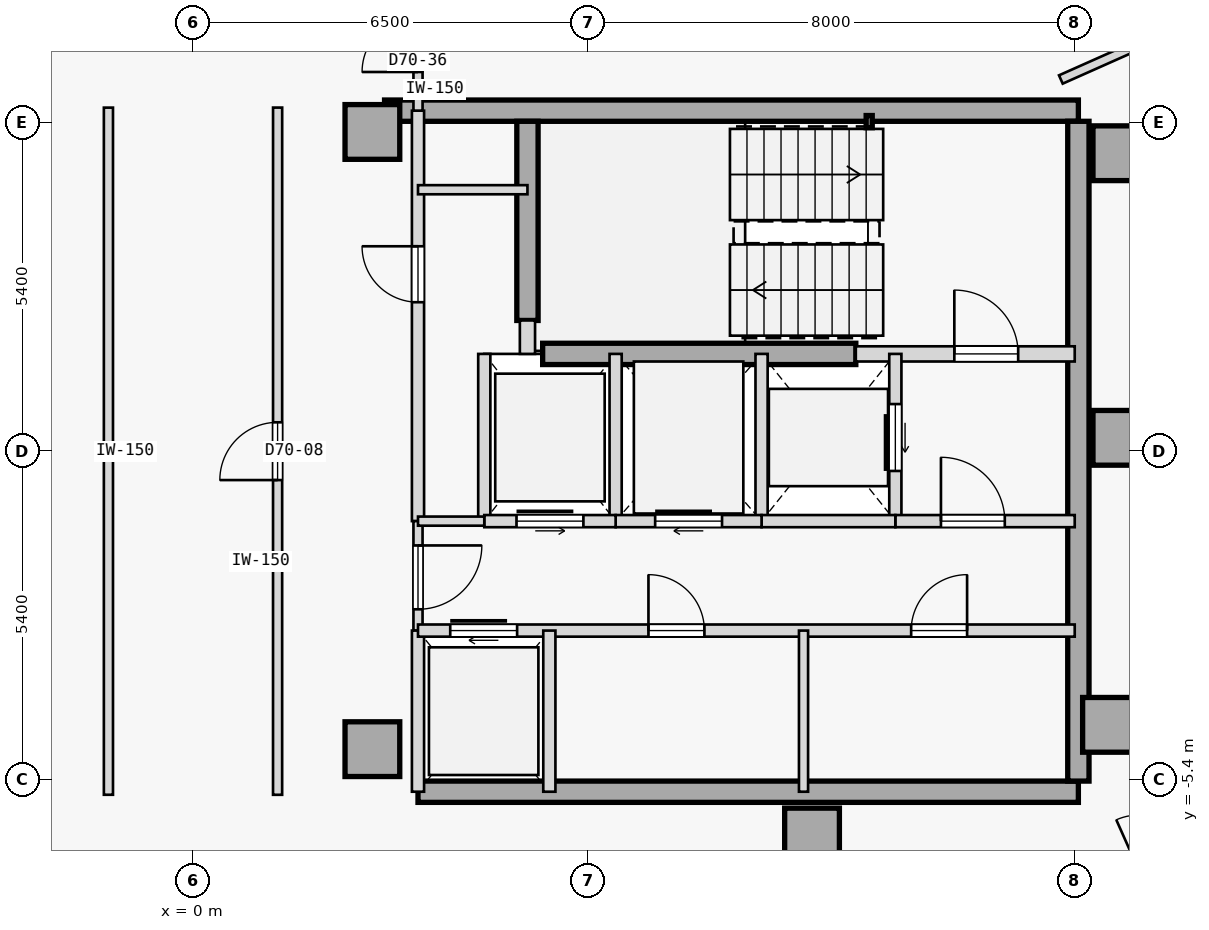
"""IFC4 building model, lengths in metres.
Left out: names, types, materials, properties, quantities, classifications, styles, units other than length and angle.
Written with IfcOpenShell. Run it as: python <this file> out.ifc"""

import sys

from ifc_helpers import new_model, si_unit, direction, frame, frame_2d, origin, origin_2d, place, context, subcontext, project, spatial, rectangle, hollow_rectangle, extrude, element, fill, save


model = new_model("IFC4")
c1 = context("Model", 3, precision=1e-05, world=origin(), true_north=direction((0.0, 1.0)))
c2 = subcontext(c1, "Body", "Model", "MODEL_VIEW")
j1 = project(units=[si_unit("LENGTHUNIT", "METRE"), si_unit("PLANEANGLEUNIT", "RADIAN")], contexts=[c1])
p1 = place(None, origin())
s1 = spatial("IfcSite", under=j1, at=p1, CompositionType="ELEMENT")
p2 = place(p1, origin())
s2 = spatial("IfcBuilding", under=s1, at=p2, CompositionType="ELEMENT")
p3 = place(p2, frame((0.0, 0.0, 262.2)))
s3 = spatial("IfcBuildingStorey", under=s2, at=p3, CompositionType="ELEMENT", Elevation=262.2)
for number, where, z_axis, x_axis in (
    (1, (15.25, 4.9, 0.0), (0.0, 0.0, 1.0), (1.0, 0.0, 0.0)),
    (2, (15.25, 0.22, 0.0), (0.0, 0.0, 1.0), (1.0, 0.0, 0.0)),
    (3, (15.08, -4.5, 0.0), (0.0, 0.0, 1.0), (1.0, 0.0, 0.0)),
    (4, (10.18, -6.32, 0.0), (0.0, 0.0, 1.0), (1.0, 0.0, 0.0)),
    (5, (2.95, -4.9, 0.0), (0.0, 0.0, 1.0), (1.0, 0.0, 0.0)),
    (6, (2.95, 5.25, 0.0), (0.0, 0.0, 1.0), (1.0, 0.0, 0.0)),
):
    element("IfcColumn", number, at=place(p3, frame(where, z_axis=z_axis, x_axis=x_axis)), inside=s3, PredefinedType="COLUMN", context=c2, shape_type="SweptSolid", body=[
        extrude(rectangle(XDim=0.9, YDim=0.9, at=origin_2d()), origin(), (0.0, 0.0, 1.0), 3.35),
    ])
p4 = place(p3, frame((3.15, 5.6, 0.0), z_axis=(0.0, 0.0, 1.0), x_axis=(1.0, 0.0, 0.0)))
e7 = element("IfcWall", 7, at=p4, inside=s3, PredefinedType="SHEAR", context=c2, shape_type="SweptSolid", body=[
    extrude(rectangle(XDim=11.41, YDim=0.35, at=frame_2d((5.705, 0.0))), origin(), (0.0, 0.0, 1.0), 3.125),
])
p5 = place(p3, frame((3.7, -5.6, 0.0), z_axis=(0.0, 0.0, 1.0), x_axis=(1.0, 0.0, 0.0)))
e8 = element("IfcWall", 8, at=p5, inside=s3, PredefinedType="SHEAR", context=c2, shape_type="SweptSolid", body=[
    extrude(rectangle(XDim=10.86, YDim=0.35, at=frame_2d((5.43, 0.0))), origin(), (0.0, 0.0, 1.0), 3.125),
])
p6 = place(p3, frame((14.56, -5.425, 0.0), z_axis=(0.0, 0.0, 1.0), x_axis=(0.0, 1.0, 0.0)))
e9 = element("IfcWall", 9, at=p6, inside=s3, PredefinedType="SHEAR", context=c2, shape_type="SweptSolid", body=[
    extrude(rectangle(XDim=10.85, YDim=0.35, at=frame_2d((5.425, 0.0))), origin(), (0.0, 0.0, 1.0), 3.125),
])
p7 = place(p3, frame((5.5, 2.15, 0.0), z_axis=(0.0, 0.0, 1.0), x_axis=(0.0, 1.0, 0.0)))
e10 = element("IfcWall", 10, at=p7, inside=s3, PredefinedType="SHEAR", context=c2, shape_type="SweptSolid", body=[
    extrude(rectangle(XDim=3.275, YDim=0.35, at=frame_2d((1.638, 0.0))), origin(), (0.0, 0.0, 1.0), 3.125),
])
p8 = place(p3, frame((5.75, 1.6, 0.0), z_axis=(0.0, 0.0, 1.0), x_axis=(1.0, 0.0, 0.0)))
e11 = element("IfcWall", 11, at=p8, inside=s3, PredefinedType="SHEAR", context=c2, shape_type="SweptSolid", body=[
    extrude(rectangle(XDim=5.15, YDim=0.35, at=frame_2d((2.575, 0.0))), origin(), (0.0, 0.0, 1.0), 3.125),
])
p9 = place(p3, frame((11.12, 5.42, 0.0), z_axis=(0.0, 0.0, 1.0), x_axis=(1.0, 0.0, 0.0)))
e12 = element("IfcColumn", 12, at=p9, inside=s3, PredefinedType="COLUMN", context=c2, shape_type="SweptSolid", body=[
    extrude(hollow_rectangle(XDim=0.1, YDim=0.2, WallThickness=0.008, at=origin_2d()), origin(), (0.0, 0.0, 1.0), 3.35),
])
p10 = place(p3, frame((10.9, 1.6, 0.0), z_axis=(0.0, 0.0, 1.0), x_axis=(1.0, 0.0, 0.0)))
e13 = element("IfcWall", 13, at=p10, inside=s3, PredefinedType="STANDARD", context=c2, shape_type="SweptSolid", body=[
    extrude(rectangle(XDim=3.6, YDim=0.25, at=frame_2d((1.8, 0.0))), origin(), (0.0, 0.0, 1.0), 3.125),
])
p11 = place(p10, frame((1.62, 0.0, 0.0)))
e14 = element("IfcOpeningElement", 14, at=p11, cuts=e13, PredefinedType="OPENING", context=c2, shape_type="SweptSolid", body=[
    extrude(rectangle(XDim=1.05, YDim=2.15, at=frame_2d((0.525, 1.075))), frame((0.0, 0.135, 0.0), z_axis=(0.0, -1.0, 0.0), x_axis=(1.0, 0.0, 0.0)), (0.0, 0.0, 1.0), 0.27),
])
p12 = place(p3, frame((5.5, 1.6, 0.0), z_axis=(0.0, 0.0, 1.0), x_axis=(0.0, 1.0, 0.0)))
e15 = element("IfcWall", 15, at=p12, inside=s3, PredefinedType="STANDARD", context=c2, shape_type="SweptSolid", body=[
    extrude(rectangle(XDim=0.55, YDim=0.25, at=frame_2d((0.275, 0.0))), origin(), (0.0, 0.0, 1.0), 3.125),
])
p13 = place(p3, frame((3.7, -1.15, 0.0), z_axis=(0.0, 0.0, 1.0), x_axis=(0.0, 1.0, 0.0)))
e16 = element("IfcWall", 16, at=p13, inside=s3, PredefinedType="STANDARD", context=c2, shape_type="SweptSolid", body=[
    extrude(rectangle(XDim=6.75, YDim=0.2, at=frame_2d((3.375, 0.0))), origin(), (0.0, 0.0, 1.0), 3.125),
])
p14 = place(p13, frame((3.6, 0.0, 0.0)))
e17 = element("IfcOpeningElement", 17, at=p14, cuts=e16, PredefinedType="OPENING", context=c2, shape_type="SweptSolid", body=[
    extrude(rectangle(XDim=0.92, YDim=2.15, at=frame_2d((0.46, 1.075))), frame((0.0, 0.11, 0.0), z_axis=(0.0, -1.0, 0.0), x_axis=(1.0, 0.0, 0.0)), (0.0, 0.0, 1.0), 0.22),
])
p15 = place(p3, frame((3.7, -2.95, 0.0), z_axis=(0.0, 0.0, 1.0), x_axis=(0.0, 1.0, 0.0)))
e18 = element("IfcWall", 18, at=p15, inside=s3, PredefinedType="PARTITIONING", context=c2, shape_type="SweptSolid", body=[
    extrude(rectangle(XDim=1.8, YDim=0.15, at=frame_2d((0.9, 0.0))), origin(), (0.0, 0.0, 1.0), 3.125),
])
p16 = place(p15, frame((0.35, 0.0, 0.0)))
e19 = element("IfcOpeningElement", 19, at=p16, cuts=e18, PredefinedType="OPENING", context=c2, shape_type="SweptSolid", body=[
    extrude(rectangle(XDim=1.05, YDim=2.18, at=frame_2d((0.525, 1.09))), frame((0.0, 0.085, 0.0), z_axis=(0.0, -1.0, 0.0), x_axis=(1.0, 0.0, 0.0)), (0.0, 0.0, 1.0), 0.17),
])
p17 = place(p3, frame((3.7, -5.6, 0.0), z_axis=(0.0, 0.0, 1.0), x_axis=(0.0, 1.0, 0.0)))
e20 = element("IfcWall", 20, at=p17, inside=s3, PredefinedType="STANDARD", context=c2, shape_type="SweptSolid", body=[
    extrude(rectangle(XDim=2.65, YDim=0.2, at=frame_2d((1.325, 0.0))), origin(), (0.0, 0.0, 1.0), 3.125),
])
p18 = place(p3, frame((11.55, -1.15, 0.0), z_axis=(0.0, 0.0, 1.0), x_axis=(0.0, 1.0, 0.0)))
e21 = element("IfcWall", 21, at=p18, inside=s3, PredefinedType="STANDARD", context=c2, shape_type="SweptSolid", body=[
    extrude(rectangle(XDim=2.75, YDim=0.2, at=frame_2d((1.375, 0.0))), origin(), (0.0, 0.0, 1.0), 3.125),
])
p19 = place(p18, frame((0.825, 0.0, 0.0)))
e22 = element("IfcOpeningElement", 22, at=p19, cuts=e21, PredefinedType="OPENING", context=c2, shape_type="SweptSolid", body=[
    extrude(rectangle(XDim=1.1, YDim=2.15, at=frame_2d((0.55, 1.075))), frame((0.0, 0.11, 0.0), z_axis=(0.0, -1.0, 0.0), x_axis=(1.0, 0.0, 0.0)), (0.0, 0.0, 1.0), 0.22),
])
p20 = place(p3, frame((9.35, -1.15, 0.0), z_axis=(0.0, 0.0, 1.0), x_axis=(0.0, 1.0, 0.0)))
e23 = element("IfcWall", 23, at=p20, inside=s3, PredefinedType="STANDARD", context=c2, shape_type="SweptSolid", body=[
    extrude(rectangle(XDim=2.75, YDim=0.2, at=frame_2d((1.375, 0.0))), origin(), (0.0, 0.0, 1.0), 3.125),
])
p21 = place(p3, frame((11.55, -1.15, 0.0), z_axis=(0.0, 0.0, 1.0), x_axis=(1.0, 0.0, 0.0)))
e24 = element("IfcWall", 24, at=p21, inside=s3, PredefinedType="STANDARD", context=c2, shape_type="SweptSolid", body=[
    extrude(rectangle(XDim=2.95, YDim=0.2, at=frame_2d((1.475, 0.0))), origin(), (0.0, 0.0, 1.0), 3.125),
])
p22 = place(p21, frame((0.75, 0.0, 0.0)))
e25 = element("IfcOpeningElement", 25, at=p22, cuts=e24, PredefinedType="OPENING", context=c2, shape_type="SweptSolid", body=[
    extrude(rectangle(XDim=1.05, YDim=2.18, at=frame_2d((0.525, 1.09))), frame((0.0, 0.11, 0.0), z_axis=(0.0, -1.0, 0.0), x_axis=(1.0, 0.0, 0.0)), (0.0, 0.0, 1.0), 0.22),
])
p23 = place(p3, frame((9.35, -1.15, 0.0), z_axis=(0.0, 0.0, 1.0), x_axis=(1.0, 0.0, 0.0)))
e26 = element("IfcWall", 26, at=p23, inside=s3, PredefinedType="STANDARD", context=c2, shape_type="SweptSolid", body=[
    extrude(rectangle(XDim=2.2, YDim=0.2, at=frame_2d((1.1, 0.0))), origin(), (0.0, 0.0, 1.0), 3.125),
])
p24 = place(p3, frame((6.95, -1.15, 0.0), z_axis=(0.0, 0.0, 1.0), x_axis=(0.0, 1.0, 0.0)))
e27 = element("IfcWall", 27, at=p24, inside=s3, PredefinedType="STANDARD", context=c2, shape_type="SweptSolid", body=[
    extrude(rectangle(XDim=2.75, YDim=0.2, at=frame_2d((1.375, 0.0))), origin(), (0.0, 0.0, 1.0), 3.125),
])
p25 = place(p3, frame((6.95, -1.15, 0.0), z_axis=(0.0, 0.0, 1.0), x_axis=(1.0, 0.0, 0.0)))
e28 = element("IfcWall", 28, at=p25, inside=s3, PredefinedType="STANDARD", context=c2, shape_type="SweptSolid", body=[
    extrude(rectangle(XDim=2.4, YDim=0.2, at=frame_2d((1.2, 0.0))), origin(), (0.0, 0.0, 1.0), 3.125),
])
p26 = place(p25, frame((0.65, 0.0, 0.0)))
e29 = element("IfcOpeningElement", 29, at=p26, cuts=e28, PredefinedType="OPENING", context=c2, shape_type="SweptSolid", body=[
    extrude(rectangle(XDim=1.1, YDim=2.15, at=frame_2d((0.55, 1.075))), frame((0.0, 0.11, 0.0), z_axis=(0.0, -1.0, 0.0), x_axis=(1.0, 0.0, 0.0)), (0.0, 0.0, 1.0), 0.22),
])
p27 = place(p3, frame((4.79, -1.15, 0.0), z_axis=(0.0, 0.0, 1.0), x_axis=(0.0, 1.0, 0.0)))
e30 = element("IfcWall", 30, at=p27, inside=s3, PredefinedType="STANDARD", context=c2, shape_type="SweptSolid", body=[
    extrude(rectangle(XDim=2.75, YDim=0.2, at=frame_2d((1.375, 0.0))), origin(), (0.0, 0.0, 1.0), 3.125),
])
p28 = place(p3, frame((4.79, -1.15, 0.0), z_axis=(0.0, 0.0, 1.0), x_axis=(1.0, 0.0, 0.0)))
e31 = element("IfcWall", 31, at=p28, inside=s3, PredefinedType="STANDARD", context=c2, shape_type="SweptSolid", body=[
    extrude(rectangle(XDim=2.16, YDim=0.2, at=frame_2d((1.08, 0.0))), origin(), (0.0, 0.0, 1.0), 3.125),
])
p29 = place(p28, frame((0.53, 0.0, 0.0)))
e32 = element("IfcOpeningElement", 32, at=p29, cuts=e31, PredefinedType="OPENING", context=c2, shape_type="SweptSolid", body=[
    extrude(rectangle(XDim=1.1, YDim=2.15, at=frame_2d((0.55, 1.075))), frame((0.0, 0.11, 0.0), z_axis=(0.0, -1.0, 0.0), x_axis=(1.0, 0.0, 0.0)), (0.0, 0.0, 1.0), 0.22),
])
p30 = place(p3, frame((3.7, -1.15, 0.0), z_axis=(0.0, 0.0, 1.0), x_axis=(1.0, 0.0, 0.0)))
e33 = element("IfcWall", 33, at=p30, inside=s3, PredefinedType="PARTITIONING", context=c2, shape_type="SweptSolid", body=[
    extrude(rectangle(XDim=1.09, YDim=0.15, at=frame_2d((0.545, 0.0))), origin(), (0.0, 0.0, 1.0), 3.125),
])
p31 = place(p3, frame((3.7, -2.95, 0.0), z_axis=(0.0, 0.0, 1.0), x_axis=(1.0, 0.0, 0.0)))
e34 = element("IfcWall", 34, at=p31, inside=s3, PredefinedType="STANDARD", context=c2, shape_type="SweptSolid", body=[
    extrude(rectangle(XDim=10.8, YDim=0.2, at=frame_2d((5.4, 0.0))), origin(), (0.0, 0.0, 1.0), 3.125),
])
p32 = place(p31, frame((0.53, 0.0, 0.0)))
e35 = element("IfcOpeningElement", 35, at=p32, cuts=e34, PredefinedType="OPENING", context=c2, shape_type="SweptSolid", body=[
    extrude(rectangle(XDim=1.1, YDim=2.15, at=frame_2d((0.55, 1.075))), frame((0.0, 0.11, 0.0), z_axis=(0.0, -1.0, 0.0), x_axis=(1.0, 0.0, 0.0)), (0.0, 0.0, 1.0), 0.22),
])
p33 = place(p31, frame((3.79, 0.0, 0.0)))
e36 = element("IfcOpeningElement", 36, at=p33, cuts=e34, PredefinedType="OPENING", context=c2, shape_type="SweptSolid", body=[
    extrude(rectangle(XDim=0.92, YDim=2.15, at=frame_2d((0.46, 1.075))), frame((0.0, 0.11, 0.0), z_axis=(0.0, -1.0, 0.0), x_axis=(1.0, 0.0, 0.0)), (0.0, 0.0, 1.0), 0.22),
])
p34 = place(p31, frame((8.11, 0.0, 0.0)))
e37 = element("IfcOpeningElement", 37, at=p34, cuts=e34, PredefinedType="OPENING", context=c2, shape_type="SweptSolid", body=[
    extrude(rectangle(XDim=0.92, YDim=2.15, at=frame_2d((0.46, 1.075))), frame((0.0, 0.11, 0.0), z_axis=(0.0, -1.0, 0.0), x_axis=(1.0, 0.0, 0.0)), (0.0, 0.0, 1.0), 0.22),
])
p35 = place(p3, frame((5.86, -5.6, 0.0), z_axis=(0.0, 0.0, 1.0), x_axis=(0.0, 1.0, 0.0)))
e38 = element("IfcWall", 38, at=p35, inside=s3, PredefinedType="STANDARD", context=c2, shape_type="SweptSolid", body=[
    extrude(rectangle(XDim=2.65, YDim=0.2, at=frame_2d((1.325, 0.0))), origin(), (0.0, 0.0, 1.0), 3.125),
])
p36 = place(p3, frame((10.04, -5.6, 0.0), z_axis=(0.0, 0.0, 1.0), x_axis=(0.0, 1.0, 0.0)))
e39 = element("IfcWall", 39, at=p36, inside=s3, PredefinedType="PARTITIONING", context=c2, shape_type="SweptSolid", body=[
    extrude(rectangle(XDim=2.65, YDim=0.15, at=frame_2d((1.325, 0.0))), origin(), (0.0, 0.0, 1.0), 3.125),
])
p37 = place(p3, frame((3.7, 4.3, 0.0), z_axis=(0.0, 0.0, 1.0), x_axis=(1.0, 0.0, 0.0)))
e40 = element("IfcWall", 40, at=p37, inside=s3, PredefinedType="PARTITIONING", context=c2, shape_type="SweptSolid", body=[
    extrude(rectangle(XDim=1.8, YDim=0.15, at=frame_2d((0.9, 0.0))), origin(), (0.0, 0.0, 1.0), 3.125),
])
p38 = place(p3, frame((-1.391, -5.65, 0.0), z_axis=(0.0, 0.0, 1.0), x_axis=(-2.1605738e-05, 0.999999999767, 0.0)))
e41 = element("IfcWall", 41, at=p38, inside=s3, PredefinedType="PARTITIONING", context=c2, shape_type="SweptSolid", body=[
    extrude(rectangle(XDim=11.3, YDim=0.15, at=frame_2d((5.65, 0.0))), origin(), (0.0, 0.0, 1.0), 3.125),
])
p39 = place(p3, frame((1.391, -5.65, 0.0), z_axis=(0.0, 0.0, 1.0), x_axis=(4.3206809e-05, 0.999999999067, 0.0)))
e42 = element("IfcWall", 42, at=p39, inside=s3, PredefinedType="PARTITIONING", context=c2, shape_type="SweptSolid", body=[
    extrude(rectangle(XDim=11.301, YDim=0.15, at=frame_2d((5.65, 0.0))), origin(), (0.0, 0.0, 1.0), 3.125),
])
p40 = place(p39, frame((5.176, 0.0, 0.0)))
e43 = element("IfcOpeningElement", 43, at=p40, cuts=e42, PredefinedType="OPENING", context=c2, shape_type="SweptSolid", body=[
    extrude(rectangle(XDim=0.95, YDim=2.15, at=frame_2d((0.475, 1.075))), frame((0.0, 0.085, 0.0), z_axis=(0.0, -1.0, 0.0), x_axis=(1.0, 0.0, 0.0)), (0.0, 0.0, 1.0), 0.17),
])
p41 = place(p3, frame((-17.499, 6.038, 0.0), z_axis=(0.0, 0.0, 1.0), x_axis=(0.913541623157, 0.406745255362, 0.0)))
e44 = element("IfcWall", 44, at=p41, inside=s3, PredefinedType="PARTITIONING", context=c2, shape_type="SweptSolid", body=[
    extrude(rectangle(XDim=17.879, YDim=0.15, at=frame_2d((8.939, 0.0))), origin(), (0.0, 0.0, 1.0), 3.125),
])
p42 = place(p41, frame((8.465, 0.0, 0.0)))
e45 = element("IfcOpeningElement", 45, at=p42, cuts=e44, PredefinedType="OPENING", context=c2, shape_type="SweptSolid", body=[
    extrude(rectangle(XDim=0.95, YDim=2.15, at=frame_2d((0.475, 1.075))), frame((0.0, 0.085, 0.0), z_axis=(0.0, -1.0, 0.0), x_axis=(1.0, 0.0, 0.0)), (0.0, 0.0, 1.0), 0.17),
])
p43 = place(p3, frame((12.635, -8.204, 0.0), z_axis=(0.0, 0.0, 1.0), x_axis=(0.913541702649, 0.406745076825, 0.0)))
e46 = element("IfcWall", 46, at=p43, inside=s3, PredefinedType="PARTITIONING", context=c2, shape_type="SweptSolid", body=[
    extrude(rectangle(XDim=7.318, YDim=0.15, at=frame_2d((3.659, 0.0))), origin(), (0.0, 0.0, 1.0), 3.125),
])
p44 = place(p43, frame((3.199, 0.0, 0.0)))
e47 = element("IfcOpeningElement", 47, at=p44, cuts=e46, PredefinedType="OPENING", context=c2, shape_type="SweptSolid", body=[
    extrude(rectangle(XDim=0.92, YDim=2.15, at=frame_2d((0.46, 1.075))), frame((0.0, 0.085, 0.0), z_axis=(0.0, -1.0, 0.0), x_axis=(1.0, 0.0, 0.0)), (0.0, 0.0, 1.0), 0.17),
])
p45 = place(p3, frame((3.7, 5.601, 0.0), z_axis=(0.0, 0.0, 1.0), x_axis=(0.0, 1.0, 0.0)))
e48 = element("IfcWall", 48, at=p45, inside=s3, PredefinedType="PARTITIONING", context=c2, shape_type="SweptSolid", body=[
    extrude(rectangle(XDim=1.775, YDim=0.15, at=frame_2d((0.888, 0.0))), origin(), (0.0, 0.0, 1.0), 3.125),
])
p46 = place(p45, frame((0.635, 0.0, 0.0)))
e49 = element("IfcOpeningElement", 49, at=p46, cuts=e48, PredefinedType="OPENING", context=c2, shape_type="SweptSolid", body=[
    extrude(rectangle(XDim=0.92, YDim=2.15, at=frame_2d((0.46, 1.075))), frame((0.0, 0.085, 0.0), z_axis=(0.0, -1.0, 0.0), x_axis=(1.0, 0.0, 0.0)), (0.0, 0.0, 1.0), 0.17),
])
p47 = place(p3, frame((14.272, 6.113, 0.0), z_axis=(0.0, 0.0, 1.0), x_axis=(0.913551014388, 0.406724162191, 0.0)))
e50 = element("IfcWall", 50, at=p47, inside=s3, PredefinedType="PARTITIONING", context=c2, shape_type="SweptSolid", body=[
    extrude(rectangle(XDim=14.192, YDim=0.15, at=frame_2d((7.096, 0.0))), origin(), (0.0, 0.0, 1.0), 3.125),
])
p48 = place(p47, frame((6.636, 0.0, 0.0)))
e51 = element("IfcOpeningElement", 51, at=p48, cuts=e50, PredefinedType="OPENING", context=c2, shape_type="SweptSolid", body=[
    extrude(rectangle(XDim=0.92, YDim=2.15, at=frame_2d((0.46, 1.075))), frame((0.0, 0.085, 0.0), z_axis=(0.0, -1.0, 0.0), x_axis=(1.0, 0.0, 0.0)), (0.0, 0.0, 1.0), 0.17),
])
p49 = place(p11, origin())
e52 = element("IfcDoor", 52, at=p49, inside=s3, OperationType="SINGLE_SWING_LEFT", PredefinedType="DOOR", context=c2, shape_type="SweptSolid", body=[
    extrude(rectangle(XDim=1.05, YDim=2.15, at=frame_2d((0.525, 1.075))), frame((0.0, 0.025, 0.0), z_axis=(0.0, -1.0, 0.0), x_axis=(1.0, 0.0, 0.0)), (0.0, 0.0, 1.0), 0.05),
])
fill(e14, e52)
p50 = place(p22, origin())
e53 = element("IfcDoor", 53, at=p50, inside=s3, OperationType="SINGLE_SWING_LEFT", PredefinedType="DOOR", context=c2, shape_type="SweptSolid", body=[
    extrude(rectangle(XDim=1.05, YDim=2.18, at=frame_2d((0.525, 1.09))), frame((0.0, 0.025, 0.0), z_axis=(0.0, -1.0, 0.0), x_axis=(1.0, 0.0, 0.0)), (0.0, 0.0, 1.0), 0.05),
])
fill(e25, e53)
p51 = place(p16, frame((1.05, 0.0, 0.0), z_axis=(0.0, 0.0, 1.0), x_axis=(-1.0, 0.0, 0.0)))
e54 = element("IfcDoor", 54, at=p51, inside=s3, OperationType="SINGLE_SWING_RIGHT", PredefinedType="DOOR", context=c2, shape_type="SweptSolid", body=[
    extrude(rectangle(XDim=1.05, YDim=2.18, at=frame_2d((0.525, 1.09))), frame((0.0, 0.025, 0.0), z_axis=(0.0, -1.0, 0.0), x_axis=(1.0, 0.0, 0.0)), (0.0, 0.0, 1.0), 0.05),
])
fill(e19, e54)
p52 = place(p19, origin())
e55 = element("IfcDoor", 55, at=p52, inside=s3, OperationType="SLIDING_TO_RIGHT", PredefinedType="DOOR", context=c2, shape_type="SweptSolid", body=[
    extrude(rectangle(XDim=1.1, YDim=2.15, at=frame_2d((0.55, 1.075))), frame((0.0, 0.025, 0.0), z_axis=(0.0, -1.0, 0.0), x_axis=(1.0, 0.0, 0.0)), (0.0, 0.0, 1.0), 0.05),
])
fill(e22, e55)
p53 = place(p26, origin())
e56 = element("IfcDoor", 56, at=p53, inside=s3, OperationType="SLIDING_TO_RIGHT", PredefinedType="DOOR", context=c2, shape_type="SweptSolid", body=[
    extrude(rectangle(XDim=1.1, YDim=2.15, at=frame_2d((0.55, 1.075))), frame((0.0, 0.025, 0.0), z_axis=(0.0, -1.0, 0.0), x_axis=(1.0, 0.0, 0.0)), (0.0, 0.0, 1.0), 0.05),
])
fill(e29, e56)
p54 = place(p29, origin())
e57 = element("IfcDoor", 57, at=p54, inside=s3, OperationType="SLIDING_TO_LEFT", PredefinedType="DOOR", context=c2, shape_type="SweptSolid", body=[
    extrude(rectangle(XDim=1.1, YDim=2.15, at=frame_2d((0.55, 1.075))), frame((0.0, 0.025, 0.0), z_axis=(0.0, -1.0, 0.0), x_axis=(1.0, 0.0, 0.0)), (0.0, 0.0, 1.0), 0.05),
])
fill(e32, e57)
p55 = place(p32, origin())
e58 = element("IfcDoor", 58, at=p55, inside=s3, OperationType="SLIDING_TO_RIGHT", PredefinedType="DOOR", context=c2, shape_type="SweptSolid", body=[
    extrude(rectangle(XDim=1.1, YDim=2.15, at=frame_2d((0.55, 1.075))), frame((0.0, 0.025, 0.0), z_axis=(0.0, -1.0, 0.0), x_axis=(1.0, 0.0, 0.0)), (0.0, 0.0, 1.0), 0.05),
])
fill(e35, e58)
p56 = place(p33, origin())
e59 = element("IfcDoor", 59, at=p56, inside=s3, OperationType="SINGLE_SWING_LEFT", PredefinedType="DOOR", context=c2, shape_type="SweptSolid", body=[
    extrude(rectangle(XDim=0.92, YDim=2.15, at=frame_2d((0.46, 1.075))), frame((0.0, 0.025, 0.0), z_axis=(0.0, -1.0, 0.0), x_axis=(1.0, 0.0, 0.0)), (0.0, 0.0, 1.0), 0.05),
])
fill(e36, e59)
p57 = place(p34, origin())
e60 = element("IfcDoor", 60, at=p57, inside=s3, OperationType="SINGLE_SWING_RIGHT", PredefinedType="DOOR", context=c2, shape_type="SweptSolid", body=[
    extrude(rectangle(XDim=0.92, YDim=2.15, at=frame_2d((0.46, 1.075))), frame((0.0, 0.025, 0.0), z_axis=(0.0, -1.0, 0.0), x_axis=(1.0, 0.0, 0.0)), (0.0, 0.0, 1.0), 0.05),
])
fill(e37, e60)
p58 = place(p14, origin())
e61 = element("IfcDoor", 61, at=p58, inside=s3, OperationType="SINGLE_SWING_RIGHT", PredefinedType="DOOR", context=c2, shape_type="SweptSolid", body=[
    extrude(rectangle(XDim=0.92, YDim=2.15, at=frame_2d((0.46, 1.075))), frame((0.0, 0.025, 0.0), z_axis=(0.0, -1.0, 0.0), x_axis=(1.0, 0.0, 0.0)), (0.0, 0.0, 1.0), 0.05),
])
fill(e17, e61)
p59 = place(p40, origin())
e62 = element("IfcDoor", 62, at=p59, inside=s3, OperationType="SINGLE_SWING_LEFT", PredefinedType="DOOR", context=c2, shape_type="SweptSolid", body=[
    extrude(rectangle(XDim=0.95, YDim=2.15, at=frame_2d((0.475, 1.075))), frame((0.0, 0.025, 0.0), z_axis=(0.0, -1.0, 0.0), x_axis=(1.0, 0.0, 0.0)), (0.0, 0.0, 1.0), 0.05),
])
fill(e43, e62)
p60 = place(p46, origin())
e63 = element("IfcDoor", 63, at=p60, inside=s3, OperationType="SINGLE_SWING_LEFT", PredefinedType="DOOR", context=c2, shape_type="SweptSolid", body=[
    extrude(rectangle(XDim=0.92, YDim=2.15, at=frame_2d((0.46, 1.075))), frame((0.0, 0.025, 0.0), z_axis=(0.0, -1.0, 0.0), x_axis=(1.0, 0.0, 0.0)), (0.0, 0.0, 1.0), 0.05),
])
fill(e49, e63)
save(model, sys.argv[1])
